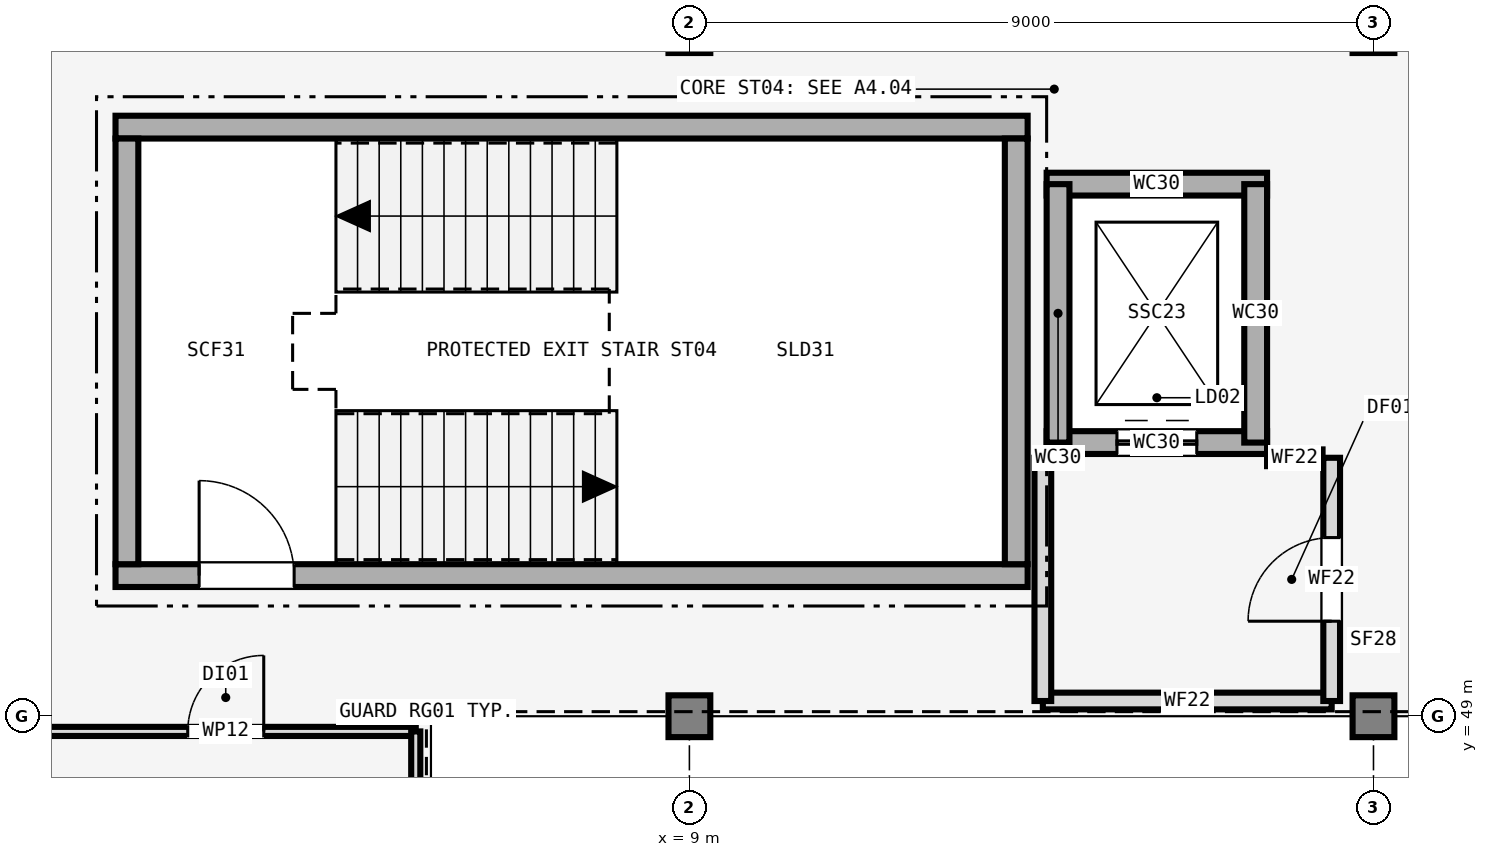
"""IFC4 building model, lengths in metres.
Left out: names, types, materials, properties, quantities, classifications, styles, units other than length and angle.
Written with IfcOpenShell. Run it as: python <this file> out.ifc"""

import sys

from ifc_helpers import new_model, si_unit, direction, frame, frame_2d, origin, origin_2d, place, context, subcontext, project, spatial, rectangle, extrude, element, fill, save


model = new_model("IFC4")
c1 = context("Model", 3, precision=1e-05, world=origin(), true_north=direction((0.0, 1.0)))
c2 = subcontext(c1, "Body", "Model", "MODEL_VIEW")
j1 = project(units=[si_unit("LENGTHUNIT", "METRE"), si_unit("PLANEANGLEUNIT", "RADIAN")], contexts=[c1])
p1 = place(None, origin())
s1 = spatial("IfcSite", under=j1, at=p1, CompositionType="ELEMENT")
p2 = place(p1, origin())
s2 = spatial("IfcBuilding", under=s1, at=p2, CompositionType="ELEMENT")
p3 = place(p2, frame((0.0, 0.0, 9.3)))
s3 = spatial("IfcBuildingStorey", under=s2, at=p3, CompositionType="ELEMENT", Elevation=9.3)
for number, where, z_axis, x_axis in (
    (1, (9.0, 49.0, 0.0), (0.0, 0.0, 1.0), (1.0, 0.0, 0.0)),
    (2, (9.0, 58.0, 0.0), (0.0, 0.0, 1.0), (1.0, 0.0, 0.0)),
    (3, (18.0, 49.0, 0.0), (0.0, 0.0, 1.0), (1.0, 0.0, 0.0)),
    (4, (18.0, 58.0, 0.0), (0.0, 0.0, 1.0), (1.0, 0.0, 0.0)),
):
    element("IfcColumn", number, at=place(p3, frame(where, z_axis=z_axis, x_axis=x_axis)), inside=s3, PredefinedType="COLUMN", context=c2, shape_type="SweptSolid", body=[
        extrude(rectangle(XDim=0.55, YDim=0.55, at=origin_2d()), origin(), (0.0, 0.0, 1.0), 4.2),
    ])
p4 = place(p3, frame((1.45, 50.85, 0.0), z_axis=(0.0, 0.0, 1.0), x_axis=(1.0, 0.0, 0.0)))
e5 = element("IfcWall", 5, at=p4, inside=s3, PredefinedType="SHEAR", context=c2, shape_type="SweptSolid", body=[
    extrude(rectangle(XDim=12.0, YDim=0.3, at=frame_2d((6.0, 0.0))), origin(), (0.0, 0.0, 1.0), 4.2),
])
p5 = place(p4, frame((1.1, 0.0, 0.0)))
e6 = element("IfcOpeningElement", 6, at=p5, cuts=e5, PredefinedType="OPENING", context=c2, shape_type="SweptSolid", body=[
    extrude(rectangle(XDim=1.25, YDim=2.15, at=frame_2d((0.625, 1.075))), frame((0.0, 0.16, 0.0), z_axis=(0.0, -1.0, 0.0), x_axis=(1.0, 0.0, 0.0)), (0.0, 0.0, 1.0), 0.32),
])
p6 = place(p3, frame((13.45, 56.75, 0.0), z_axis=(0.0, 0.0, 1.0), x_axis=(-1.0, 0.0, 0.0)))
e7 = element("IfcWall", 7, at=p6, inside=s3, PredefinedType="SHEAR", context=c2, shape_type="SweptSolid", body=[
    extrude(rectangle(XDim=12.0, YDim=0.3, at=frame_2d((6.0, 0.0))), origin(), (0.0, 0.0, 1.0), 4.2),
])
for number, where, z_axis, x_axis in (
    (8, (1.6, 56.6, 0.0), (0.0, 0.0, 1.0), (0.0, -1.0, 0.0)),
    (9, (13.3, 51.0, 0.0), (0.0, 0.0, 1.0), (0.0, 1.0, 0.0)),
):
    element("IfcWall", number, at=place(p3, frame(where, z_axis=z_axis, x_axis=x_axis)), inside=s3, PredefinedType="SHEAR", context=c2, shape_type="SweptSolid", body=[
        extrude(rectangle(XDim=5.6, YDim=0.3, at=frame_2d((2.8, 0.0))), origin(), (0.0, 0.0, 1.0), 4.2),
    ])
p7 = place(p3, frame((13.7, 52.6, 0.0), z_axis=(0.0, 0.0, 1.0), x_axis=(1.0, 0.0, 0.0)))
e10 = element("IfcWall", 10, at=p7, inside=s3, PredefinedType="SHEAR", context=c2, shape_type="SweptSolid", body=[
    extrude(rectangle(XDim=2.9, YDim=0.3, at=frame_2d((1.45, 0.0))), origin(), (0.0, 0.0, 1.0), 4.2),
])
p8 = place(p7, frame((0.925, 0.0, 0.0)))
e11 = element("IfcOpeningElement", 11, at=p8, cuts=e10, PredefinedType="OPENING", context=c2, shape_type="SweptSolid", body=[
    extrude(rectangle(XDim=1.05, YDim=2.15, at=frame_2d((0.525, 1.075))), frame((0.0, 0.16, 0.0), z_axis=(0.0, -1.0, 0.0), x_axis=(1.0, 0.0, 0.0)), (0.0, 0.0, 1.0), 0.32),
])
p9 = place(p3, frame((16.6, 56.0, 0.0), z_axis=(0.0, 0.0, 1.0), x_axis=(-1.0, 0.0, 0.0)))
e12 = element("IfcWall", 12, at=p9, inside=s3, PredefinedType="SHEAR", context=c2, shape_type="SweptSolid", body=[
    extrude(rectangle(XDim=2.9, YDim=0.3, at=frame_2d((1.45, 0.0))), origin(), (0.0, 0.0, 1.0), 4.2),
])
for number, where, z_axis, x_axis in (
    (13, (13.85, 56.0, 0.0), (0.0, 0.0, 1.0), (0.0, -1.0, 0.0)),
    (14, (16.45, 52.6, 0.0), (0.0, 0.0, 1.0), (0.0, 1.0, 0.0)),
):
    element("IfcWall", number, at=place(p3, frame(where, z_axis=z_axis, x_axis=x_axis)), inside=s3, PredefinedType="SHEAR", context=c2, shape_type="SweptSolid", body=[
        extrude(rectangle(XDim=3.4, YDim=0.3, at=frame_2d((1.7, 0.0))), origin(), (0.0, 0.0, 1.0), 4.2),
    ])
p10 = place(p3, frame((13.65, 49.2, 0.0), z_axis=(0.0, 0.0, 1.0), x_axis=(1.0, 0.0, 0.0)))
e15 = element("IfcWall", 15, at=p10, inside=s3, PredefinedType="SOLIDWALL", context=c2, shape_type="SweptSolid", body=[
    extrude(rectangle(XDim=3.8, YDim=0.22, at=frame_2d((1.9, 0.0))), origin(), (0.0, 0.0, 1.0), 3.12),
])
p11 = place(p3, frame((13.65, 49.2, 0.0), z_axis=(0.0, 0.0, 1.0), x_axis=(0.0, 1.0, 0.0)))
e16 = element("IfcWall", 16, at=p11, inside=s3, PredefinedType="SOLIDWALL", context=c2, shape_type="SweptSolid", body=[
    extrude(rectangle(XDim=3.2, YDim=0.22, at=frame_2d((1.6, 0.0))), origin(), (0.0, 0.0, 1.0), 3.12),
])
p12 = place(p3, frame((17.45, 49.2, 0.0), z_axis=(0.0, 0.0, 1.0), x_axis=(0.0, 1.0, 0.0)))
e17 = element("IfcWall", 17, at=p12, inside=s3, PredefinedType="SOLIDWALL", context=c2, shape_type="SweptSolid", body=[
    extrude(rectangle(XDim=3.2, YDim=0.22, at=frame_2d((1.6, 0.0))), origin(), (0.0, 0.0, 1.0), 3.12),
])
p13 = place(p12, frame((1.05, 0.0, 0.0)))
e18 = element("IfcOpeningElement", 18, at=p13, cuts=e17, PredefinedType="OPENING", context=c2, shape_type="SweptSolid", body=[
    extrude(rectangle(XDim=1.1, YDim=2.15, at=frame_2d((0.55, 1.075))), frame((0.0, 0.12, 0.0), z_axis=(0.0, -1.0, 0.0), x_axis=(1.0, 0.0, 0.0)), (0.0, 0.0, 1.0), 0.24),
])
p14 = place(p3, frame((16.6, 52.4, 0.0), z_axis=(0.0, 0.0, 1.0), x_axis=(1.0, 0.0, 0.0)))
e19 = element("IfcWall", 19, at=p14, inside=s3, PredefinedType="SOLIDWALL", context=c2, shape_type="SweptSolid", body=[
    extrude(rectangle(XDim=0.73, YDim=0.22, at=frame_2d((0.365, 0.0))), origin(), (0.0, 0.0, 1.0), 3.12),
])
p15 = place(p3, frame((0.4, 48.8, 0.0), z_axis=(0.0, 0.0, 1.0), x_axis=(1.0, 0.0, 0.0)))
e20 = element("IfcWall", 20, at=p15, inside=s3, PredefinedType="PARTITIONING", context=c2, shape_type="SweptSolid", body=[
    extrude(rectangle(XDim=5.0, YDim=0.12, at=frame_2d((2.5, 0.0))), origin(), (0.0, 0.0, 1.0), 3.12),
])
p16 = place(p15, frame((2.0, 0.0, 0.0)))
e21 = element("IfcOpeningElement", 21, at=p16, cuts=e20, PredefinedType="OPENING", context=c2, shape_type="SweptSolid", body=[
    extrude(rectangle(XDim=1.0, YDim=2.1, at=frame_2d((0.5, 1.05))), frame((0.0, 0.07, 0.0), z_axis=(0.0, -1.0, 0.0), x_axis=(1.0, 0.0, 0.0)), (0.0, 0.0, 1.0), 0.14),
])
p17 = place(p3, frame((5.4, 48.8, 0.0), z_axis=(0.0, 0.0, 1.0), x_axis=(0.0, -1.0, 0.0)))
e22 = element("IfcWall", 22, at=p17, inside=s3, PredefinedType="PARTITIONING", context=c2, shape_type="SweptSolid", body=[
    extrude(rectangle(XDim=8.4, YDim=0.12, at=frame_2d((4.2, 0.0))), origin(), (0.0, 0.0, 1.0), 3.12),
])
p18 = place(p5, origin())
e23 = element("IfcDoor", 23, at=p18, inside=s3, OperationType="SINGLE_SWING_LEFT", PredefinedType="DOOR", context=c2, shape_type="SweptSolid", body=[
    extrude(rectangle(XDim=1.25, YDim=2.15, at=frame_2d((0.625, 1.075))), frame((0.0, 0.025, 0.0), z_axis=(0.0, -1.0, 0.0), x_axis=(1.0, 0.0, 0.0)), (0.0, 0.0, 1.0), 0.05),
])
fill(e6, e23)
p19 = place(p8, origin())
e24 = element("IfcDoor", 24, at=p19, inside=s3, OperationType="DOUBLE_DOOR_SLIDING", PredefinedType="DOOR", context=c2, shape_type="SweptSolid", body=[
    extrude(rectangle(XDim=1.05, YDim=2.15, at=frame_2d((0.525, 1.075))), frame((0.0, 0.025, 0.0), z_axis=(0.0, -1.0, 0.0), x_axis=(1.0, 0.0, 0.0)), (0.0, 0.0, 1.0), 0.05),
])
fill(e11, e24)
p20 = place(p13, origin())
e25 = element("IfcDoor", 25, at=p20, inside=s3, OperationType="SINGLE_SWING_LEFT", PredefinedType="DOOR", context=c2, shape_type="SweptSolid", body=[
    extrude(rectangle(XDim=1.1, YDim=2.15, at=frame_2d((0.55, 1.075))), frame((0.0, 0.025, 0.0), z_axis=(0.0, -1.0, 0.0), x_axis=(1.0, 0.0, 0.0)), (0.0, 0.0, 1.0), 0.05),
])
fill(e18, e25)
p21 = place(p16, origin())
e26 = element("IfcDoor", 26, at=p21, inside=s3, OperationType="SINGLE_SWING_RIGHT", PredefinedType="DOOR", context=c2, shape_type="SweptSolid", body=[
    extrude(rectangle(XDim=1.0, YDim=2.1, at=frame_2d((0.5, 1.05))), frame((0.0, 0.025, 0.0), z_axis=(0.0, -1.0, 0.0), x_axis=(1.0, 0.0, 0.0)), (0.0, 0.0, 1.0), 0.05),
])
fill(e21, e26)
save(model, sys.argv[1])
